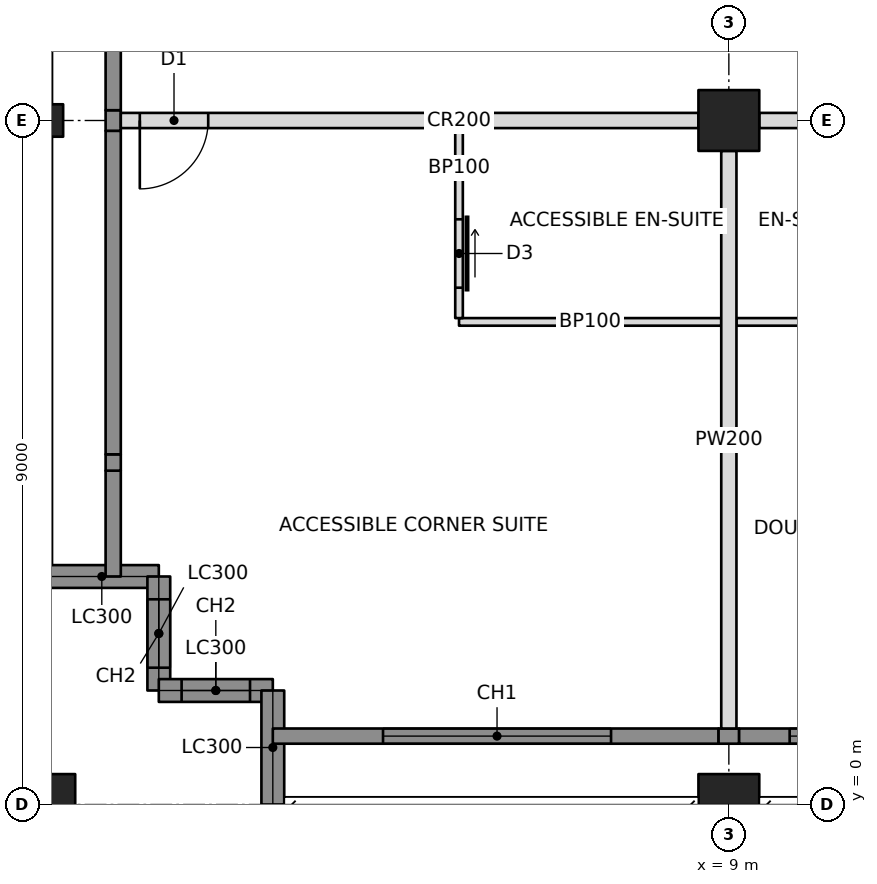
"""IFC4 building model, lengths in metres.
Left out: names, types, materials, properties, quantities, classifications, styles, units other than length and angle.
Written with IfcOpenShell. Run it as: python <this file> out.ifc"""

import sys

from ifc_helpers import new_model, si_unit, direction, frame, frame_2d, origin, origin_with_axes, origin_2d, place, context, subcontext, project, spatial, rectangle, hollow_rectangle, i_section, extrude, element, fill, save


model = new_model("IFC4")
c1 = context("Model", 3, precision=1e-05, world=origin(), true_north=direction((0.0, 1.0)))
c2 = subcontext(c1, "Body", "Model", "MODEL_VIEW")
j1 = project(units=[si_unit("LENGTHUNIT", "METRE"), si_unit("PLANEANGLEUNIT", "RADIAN")], contexts=[c1])
p1 = place(None, origin())
s1 = spatial("IfcSite", under=j1, at=p1, CompositionType="ELEMENT")
p2 = place(p1, origin())
s2 = spatial("IfcBuilding", under=s1, at=p2, CompositionType="ELEMENT")
p3 = place(p2, frame((0.0, 0.0, 208.0)))
s3 = spatial("IfcBuildingStorey", under=s2, at=p3, CompositionType="ELEMENT", Elevation=208.0)
p4 = place(p3, origin_with_axes())
e1 = element("IfcColumn", 1, at=p4, inside=s3, PredefinedType="COLUMN", context=c2, shape_type="SweptSolid", body=[
    extrude(hollow_rectangle(XDim=0.8, YDim=0.8, WallThickness=0.06, at=origin_2d()), origin(), (0.0, 0.0, 1.0), 3.4),
])
p5 = place(p3, frame((0.0, 9.0, 0.0), z_axis=(0.0, 0.0, 1.0), x_axis=(0.0, 1.0, 0.0)))
e2 = element("IfcColumn", 2, at=p5, inside=s3, PredefinedType="COLUMN", context=c2, shape_type="SweptSolid", body=[
    extrude(i_section(OverallWidth=0.427, OverallDepth=0.483, WebThickness=0.051, FlangeThickness=0.082, at=origin_2d()), origin(), (0.0, 0.0, 1.0), 3.4),
])
p6 = place(p3, frame((9.0, 0.0, 0.0), z_axis=(0.0, 0.0, 1.0), x_axis=(1.0, 0.0, 0.0)))
e3 = element("IfcColumn", 3, at=p6, inside=s3, PredefinedType="COLUMN", context=c2, shape_type="SweptSolid", body=[
    extrude(hollow_rectangle(XDim=0.8, YDim=0.8, WallThickness=0.06, at=origin_2d()), origin(), (0.0, 0.0, 1.0), 3.4),
])
p7 = place(p3, frame((9.0, 9.0, 0.0), z_axis=(0.0, 0.0, 1.0), x_axis=(1.0, 0.0, 0.0)))
e4 = element("IfcColumn", 4, at=p7, inside=s3, PredefinedType="COLUMN", context=c2, shape_type="SweptSolid", body=[
    extrude(hollow_rectangle(XDim=0.8, YDim=0.8, WallThickness=0.05, at=origin_2d()), origin(), (0.0, 0.0, 1.0), 3.4),
])
p8 = place(p3, frame((0.0, 3.0, 0.0), z_axis=(0.0, 0.0, 1.0), x_axis=(1.0, 0.0, 0.0)))
e5 = element("IfcWall", 5, at=p8, inside=s3, PredefinedType="SOLIDWALL", context=c2, shape_type="SweptSolid", body=[
    extrude(rectangle(XDim=1.5, YDim=0.3, at=frame_2d((0.75, 0.0))), origin(), (0.0, 0.0, 1.0), 2.42),
])
p9 = place(p3, frame((1.5, 3.0, 0.0), z_axis=(0.0, 0.0, 1.0), x_axis=(0.0, -1.0, 0.0)))
e6 = element("IfcWall", 6, at=p9, inside=s3, PredefinedType="SOLIDWALL", context=c2, shape_type="SweptSolid", body=[
    extrude(rectangle(XDim=1.5, YDim=0.3, at=frame_2d((0.75, 0.0))), origin(), (0.0, 0.0, 1.0), 3.2),
])
p10 = place(p9, frame((0.3, 0.0, 0.6)))
e7 = element("IfcOpeningElement", 7, at=p10, cuts=e6, PredefinedType="OPENING", context=c2, shape_type="SweptSolid", body=[
    extrude(rectangle(XDim=0.9, YDim=2.2, at=frame_2d((0.45, 1.1))), frame((0.0, 0.16, 0.0), z_axis=(0.0, -1.0, 0.0), x_axis=(1.0, 0.0, 0.0)), (0.0, 0.0, 1.0), 0.32),
])
p11 = place(p3, frame((1.5, 1.5, 0.0), z_axis=(0.0, 0.0, 1.0), x_axis=(1.0, 0.0, 0.0)))
e8 = element("IfcWall", 8, at=p11, inside=s3, PredefinedType="SOLIDWALL", context=c2, shape_type="SweptSolid", body=[
    extrude(rectangle(XDim=1.5, YDim=0.3, at=frame_2d((0.75, 0.0))), origin(), (0.0, 0.0, 1.0), 3.2),
])
p12 = place(p11, frame((0.3, 0.0, 0.6)))
e9 = element("IfcOpeningElement", 9, at=p12, cuts=e8, PredefinedType="OPENING", context=c2, shape_type="SweptSolid", body=[
    extrude(rectangle(XDim=0.9, YDim=2.2, at=frame_2d((0.45, 1.1))), frame((0.0, 0.16, 0.0), z_axis=(0.0, -1.0, 0.0), x_axis=(1.0, 0.0, 0.0)), (0.0, 0.0, 1.0), 0.32),
])
p13 = place(p3, frame((3.0, 1.5, 0.0), z_axis=(0.0, 0.0, 1.0), x_axis=(0.0, -1.0, 0.0)))
e10 = element("IfcWall", 10, at=p13, inside=s3, PredefinedType="SOLIDWALL", context=c2, shape_type="SweptSolid", body=[
    extrude(rectangle(XDim=1.5, YDim=0.3, at=frame_2d((0.75, 0.0))), origin(), (0.0, 0.0, 1.0), 2.42),
])
p14 = place(p3, frame((3.0, 0.9, 0.0), z_axis=(0.0, 0.0, 1.0), x_axis=(1.0, 0.0, 0.0)))
e11 = element("IfcWall", 11, at=p14, inside=s3, PredefinedType="SOLIDWALL", context=c2, shape_type="SweptSolid", body=[
    extrude(rectangle(XDim=5.865, YDim=0.2, at=frame_2d((2.932, 0.0))), origin(), (0.0, 0.0, 1.0), 3.2),
])
p15 = place(p14, frame((1.45, 0.0, 0.6)))
e12 = element("IfcOpeningElement", 12, at=p15, cuts=e11, PredefinedType="OPENING", context=c2, shape_type="SweptSolid", body=[
    extrude(rectangle(XDim=3.0, YDim=2.2, at=frame_2d((1.5, 1.1))), frame((0.0, 0.11, 0.0), z_axis=(0.0, -1.0, 0.0), x_axis=(1.0, 0.0, 0.0)), (0.0, 0.0, 1.0), 0.22),
])
p16 = place(p3, frame((0.9, 3.0, 0.0), z_axis=(0.0, 0.0, 1.0), x_axis=(0.0, 1.0, 0.0)))
e13 = element("IfcWall", 13, at=p16, inside=s3, PredefinedType="SOLIDWALL", context=c2, shape_type="SweptSolid", body=[
    extrude(rectangle(XDim=1.393, YDim=0.2, at=frame_2d((0.696, 0.0))), origin(), (0.0, 0.0, 1.0), 3.2),
])
p17 = place(p3, frame((1.0, 9.0, 0.0), z_axis=(0.0, 0.0, 1.0), x_axis=(1.0, 0.0, 0.0)))
e14 = element("IfcWall", 14, at=p17, inside=s3, PredefinedType="PARTITIONING", context=c2, shape_type="SweptSolid", body=[
    extrude(rectangle(XDim=7.6, YDim=0.2, at=frame_2d((3.8, 0.0))), origin(), (0.0, 0.0, 1.0), 2.438),
])
p18 = place(p17, frame((0.25, 0.0, 0.0)))
e15 = element("IfcOpeningElement", 15, at=p18, cuts=e14, PredefinedType="OPENING", context=c2, shape_type="SweptSolid", body=[
    extrude(rectangle(XDim=0.9, YDim=2.1, at=frame_2d((0.45, 1.05))), frame((0.0, 0.11, 0.0), z_axis=(0.0, -1.0, 0.0), x_axis=(1.0, 0.0, 0.0)), (0.0, 0.0, 1.0), 0.22),
])
p19 = place(p3, frame((9.4, 9.0, 0.0), z_axis=(0.0, 0.0, 1.0), x_axis=(1.0, 0.0, 0.0)))
e16 = element("IfcWall", 16, at=p19, inside=s3, PredefinedType="PARTITIONING", context=c2, shape_type="SweptSolid", body=[
    extrude(rectangle(XDim=8.2, YDim=0.2, at=frame_2d((4.1, 0.0))), origin(), (0.0, 0.0, 1.0), 2.405),
])
p20 = place(p19, frame((2.95, 0.0, 0.0)))
e17 = element("IfcOpeningElement", 17, at=p20, cuts=e16, PredefinedType="OPENING", context=c2, shape_type="SweptSolid", body=[
    extrude(rectangle(XDim=0.9, YDim=2.1, at=frame_2d((0.45, 1.05))), frame((0.0, 0.11, 0.0), z_axis=(0.0, -1.0, 0.0), x_axis=(1.0, 0.0, 0.0)), (0.0, 0.0, 1.0), 0.22),
])
p21 = place(p19, frame((4.35, 0.0, 0.0)))
e18 = element("IfcOpeningElement", 18, at=p21, cuts=e16, PredefinedType="OPENING", context=c2, shape_type="SweptSolid", body=[
    extrude(rectangle(XDim=0.9, YDim=2.1, at=frame_2d((0.45, 1.05))), frame((0.0, 0.11, 0.0), z_axis=(0.0, -1.0, 0.0), x_axis=(1.0, 0.0, 0.0)), (0.0, 0.0, 1.0), 0.22),
])
p22 = place(p3, frame((9.0, 8.6, 0.0), z_axis=(0.0, 0.0, 1.0), x_axis=(0.0, -1.0, 0.0)))
e19 = element("IfcWall", 19, at=p22, inside=s3, PredefinedType="PARTITIONING", context=c2, shape_type="SweptSolid", body=[
    extrude(rectangle(XDim=7.6, YDim=0.2, at=frame_2d((3.8, 0.0))), origin(), (0.0, 0.0, 1.0), 2.438),
])
p23 = place(p3, frame((5.45, 6.35, 0.0), z_axis=(0.0, 0.0, 1.0), x_axis=(1.0, 0.0, 0.0)))
e20 = element("IfcWall", 20, at=p23, inside=s3, PredefinedType="PARTITIONING", context=c2, shape_type="SweptSolid", body=[
    extrude(rectangle(XDim=3.45, YDim=0.1, at=frame_2d((1.725, 0.0))), origin(), (0.0, 0.0, 1.0), 2.438),
])
p24 = place(p3, frame((5.45, 8.9, 0.0), z_axis=(0.0, 0.0, 1.0), x_axis=(0.0, -1.0, 0.0)))
e21 = element("IfcWall", 21, at=p24, inside=s3, PredefinedType="PARTITIONING", context=c2, shape_type="SweptSolid", body=[
    extrude(rectangle(XDim=2.5, YDim=0.1, at=frame_2d((1.25, 0.0))), origin(), (0.0, 0.0, 1.0), 2.438),
])
p25 = place(p24, frame((1.2, 0.0, 0.0)))
e22 = element("IfcOpeningElement", 22, at=p25, cuts=e21, PredefinedType="OPENING", context=c2, shape_type="SweptSolid", body=[
    extrude(rectangle(XDim=0.9, YDim=2.1, at=frame_2d((0.45, 1.05))), frame((0.0, 0.06, 0.0), z_axis=(0.0, -1.0, 0.0), x_axis=(1.0, 0.0, 0.0)), (0.0, 0.0, 1.0), 0.12),
])
p26 = place(p3, frame((9.1, 6.35, 0.0), z_axis=(0.0, 0.0, 1.0), x_axis=(1.0, 0.0, 0.0)))
e23 = element("IfcWall", 23, at=p26, inside=s3, PredefinedType="PARTITIONING", context=c2, shape_type="SweptSolid", body=[
    extrude(rectangle(XDim=2.95, YDim=0.1, at=frame_2d((1.475, 0.0))), origin(), (0.0, 0.0, 1.0), 2.438),
])
p27 = place(p3, frame((8.865, 0.9, 0.0), z_axis=(0.0, 0.0, 1.0), x_axis=(1.0, 0.0, 0.0)))
e24 = element("IfcWall", 24, at=p27, inside=s3, PredefinedType="SOLIDWALL", context=c2, shape_type="SweptSolid", body=[
    extrude(rectangle(XDim=0.271, YDim=0.2, at=frame_2d((0.135, 0.0))), origin(), (0.0, 0.0, 1.0), 2.438),
])
p28 = place(p3, frame((9.135, 0.9, 0.0), z_axis=(0.0, 0.0, 1.0), x_axis=(1.0, 0.0, 0.0)))
e25 = element("IfcWall", 25, at=p28, inside=s3, PredefinedType="SOLIDWALL", context=c2, shape_type="SweptSolid", body=[
    extrude(rectangle(XDim=8.671, YDim=0.2, at=frame_2d((4.335, 0.0))), origin(), (0.0, 0.0, 1.0), 3.2),
])
p29 = place(p28, frame((0.665, 0.0, 0.6)))
e26 = element("IfcOpeningElement", 26, at=p29, cuts=e25, PredefinedType="OPENING", context=c2, shape_type="SweptSolid", body=[
    extrude(rectangle(XDim=3.0, YDim=2.2, at=frame_2d((1.5, 1.1))), frame((0.0, 0.11, 0.0), z_axis=(0.0, -1.0, 0.0), x_axis=(1.0, 0.0, 0.0)), (0.0, 0.0, 1.0), 0.22),
])
p30 = place(p28, frame((5.065, 0.0, 0.6)))
e27 = element("IfcOpeningElement", 27, at=p30, cuts=e25, PredefinedType="OPENING", context=c2, shape_type="SweptSolid", body=[
    extrude(rectangle(XDim=3.0, YDim=2.2, at=frame_2d((1.5, 1.1))), frame((0.0, 0.11, 0.0), z_axis=(0.0, -1.0, 0.0), x_axis=(1.0, 0.0, 0.0)), (0.0, 0.0, 1.0), 0.22),
])
p31 = place(p3, frame((0.9, 4.393, 0.0), z_axis=(0.0, 0.0, 1.0), x_axis=(0.0, 1.0, 0.0)))
e28 = element("IfcWall", 28, at=p31, inside=s3, PredefinedType="SOLIDWALL", context=c2, shape_type="SweptSolid", body=[
    extrude(rectangle(XDim=0.215, YDim=0.2, at=frame_2d((0.107, 0.0))), origin(), (0.0, 0.0, 1.0), 2.661),
])
p32 = place(p3, frame((0.9, 4.607, 0.0), z_axis=(0.0, 0.0, 1.0), x_axis=(0.0, 1.0, 0.0)))
e29 = element("IfcWall", 29, at=p32, inside=s3, PredefinedType="SOLIDWALL", context=c2, shape_type="SweptSolid", body=[
    extrude(rectangle(XDim=4.257, YDim=0.2, at=frame_2d((2.129, 0.0))), origin(), (0.0, 0.0, 1.0), 3.2),
])
p33 = place(p3, frame((0.9, 8.865, 0.0), z_axis=(0.0, 0.0, 1.0), x_axis=(0.0, 1.0, 0.0)))
e30 = element("IfcWall", 30, at=p33, inside=s3, PredefinedType="SOLIDWALL", context=c2, shape_type="SweptSolid", body=[
    extrude(rectangle(XDim=0.271, YDim=0.2, at=frame_2d((0.135, 0.0))), origin(), (0.0, 0.0, 1.0), 2.438),
])
p34 = place(p3, frame((0.9, 9.135, 0.0), z_axis=(0.0, 0.0, 1.0), x_axis=(0.0, 1.0, 0.0)))
e31 = element("IfcWall", 31, at=p34, inside=s3, PredefinedType="SOLIDWALL", context=c2, shape_type="SweptSolid", body=[
    extrude(rectangle(XDim=8.671, YDim=0.2, at=frame_2d((4.335, 0.0))), origin(), (0.0, 0.0, 1.0), 3.2),
])
p35 = place(p34, frame((2.015, 0.0, 0.6)))
e32 = element("IfcOpeningElement", 32, at=p35, cuts=e31, PredefinedType="OPENING", context=c2, shape_type="SweptSolid", body=[
    extrude(rectangle(XDim=3.0, YDim=2.2, at=frame_2d((1.5, 1.1))), frame((0.0, 0.11, 0.0), z_axis=(0.0, -1.0, 0.0), x_axis=(1.0, 0.0, 0.0)), (0.0, 0.0, 1.0), 0.22),
])
p36 = place(p34, frame((5.515, 0.0, 0.6)))
e33 = element("IfcOpeningElement", 33, at=p36, cuts=e31, PredefinedType="OPENING", context=c2, shape_type="SweptSolid", body=[
    extrude(rectangle(XDim=3.0, YDim=2.2, at=frame_2d((1.5, 1.1))), frame((0.0, 0.11, 0.0), z_axis=(0.0, -1.0, 0.0), x_axis=(1.0, 0.0, 0.0)), (0.0, 0.0, 1.0), 0.22),
])
p37 = place(p10, origin())
e34 = element("IfcWindow", 34, at=p37, inside=s3, PartitioningType="SINGLE_PANEL", PredefinedType="WINDOW", context=c2, shape_type="SweptSolid", body=[
    extrude(rectangle(XDim=0.9, YDim=2.2, at=frame_2d((0.45, 1.1))), frame((0.0, 0.03, 0.0), z_axis=(0.0, -1.0, 0.0), x_axis=(1.0, 0.0, 0.0)), (0.0, 0.0, 1.0), 0.06),
])
fill(e7, e34)
p38 = place(p12, origin())
e35 = element("IfcWindow", 35, at=p38, inside=s3, PartitioningType="SINGLE_PANEL", PredefinedType="WINDOW", context=c2, shape_type="SweptSolid", body=[
    extrude(rectangle(XDim=0.9, YDim=2.2, at=frame_2d((0.45, 1.1))), frame((0.0, 0.03, 0.0), z_axis=(0.0, -1.0, 0.0), x_axis=(1.0, 0.0, 0.0)), (0.0, 0.0, 1.0), 0.06),
])
fill(e9, e35)
p39 = place(p15, origin())
e36 = element("IfcWindow", 36, at=p39, inside=s3, PartitioningType="TRIPLE_PANEL_VERTICAL", PredefinedType="WINDOW", context=c2, shape_type="SweptSolid", body=[
    extrude(rectangle(XDim=3.0, YDim=2.2, at=frame_2d((1.5, 1.1))), frame((0.0, 0.03, 0.0), z_axis=(0.0, -1.0, 0.0), x_axis=(1.0, 0.0, 0.0)), (0.0, 0.0, 1.0), 0.06),
])
fill(e12, e36)
p40 = place(p29, origin())
e37 = element("IfcWindow", 37, at=p40, inside=s3, PartitioningType="TRIPLE_PANEL_VERTICAL", PredefinedType="WINDOW", context=c2, shape_type="SweptSolid", body=[
    extrude(rectangle(XDim=3.0, YDim=2.2, at=frame_2d((1.5, 1.1))), frame((0.0, 0.03, 0.0), z_axis=(0.0, -1.0, 0.0), x_axis=(1.0, 0.0, 0.0)), (0.0, 0.0, 1.0), 0.06),
])
fill(e26, e37)
p41 = place(p25, origin())
e38 = element("IfcDoor", 38, at=p41, inside=s3, OperationType="SLIDING_TO_LEFT", PredefinedType="DOOR", context=c2, shape_type="SweptSolid", body=[
    extrude(rectangle(XDim=0.9, YDim=2.1, at=frame_2d((0.45, 1.05))), frame((0.0, 0.025, 0.0), z_axis=(0.0, -1.0, 0.0), x_axis=(1.0, 0.0, 0.0)), (0.0, 0.0, 1.0), 0.05),
])
fill(e22, e38)
p42 = place(p18, frame((0.9, 0.0, 0.0), z_axis=(0.0, 0.0, 1.0), x_axis=(-1.0, 0.0, 0.0)))
e39 = element("IfcDoor", 39, at=p42, inside=s3, OperationType="SINGLE_SWING_RIGHT", PredefinedType="DOOR", context=c2, shape_type="SweptSolid", body=[
    extrude(rectangle(XDim=0.9, YDim=2.1, at=frame_2d((0.45, 1.05))), frame((0.0, 0.025, 0.0), z_axis=(0.0, -1.0, 0.0), x_axis=(1.0, 0.0, 0.0)), (0.0, 0.0, 1.0), 0.05),
])
fill(e15, e39)
save(model, sys.argv[1])
